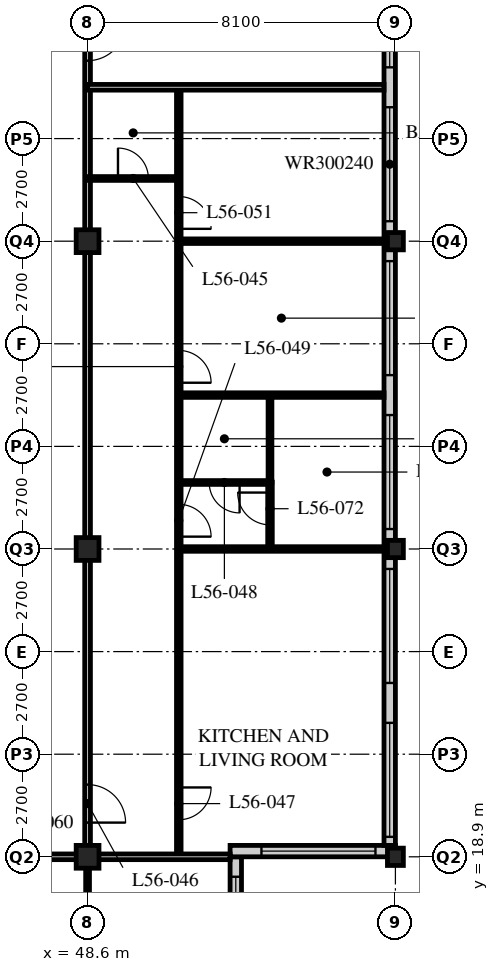
"""IFC4 building model, lengths in metres.
Left out: names, types, materials, properties, quantities, classifications, styles, units other than length and angle.
Written with IfcOpenShell. Run it as: python <this file> out.ifc"""

import sys

from ifc_helpers import new_model, si_unit, direction, frame, frame_2d, origin, origin_2d, place, context, subcontext, project, spatial, rectangle, hollow_rectangle, i_section, extrude, element, fill, save


model = new_model("IFC4")
c1 = context("Model", 3, precision=1e-05, world=origin(), true_north=direction((0.0, 1.0)))
c2 = subcontext(c1, "Body", "Model", "MODEL_VIEW")
j1 = project(units=[si_unit("LENGTHUNIT", "METRE"), si_unit("PLANEANGLEUNIT", "RADIAN")], contexts=[c1])
p1 = place(None, origin())
s1 = spatial("IfcSite", under=j1, at=p1, CompositionType="ELEMENT")
p2 = place(p1, origin())
s2 = spatial("IfcBuilding", under=s1, at=p2, CompositionType="ELEMENT")
p3 = place(p2, frame((0.0, 0.0, 217.2)))
s3 = spatial("IfcBuildingStorey", under=s2, at=p3, CompositionType="ELEMENT", Elevation=217.2)
for number, where, z_axis, x_axis in (
    (1, (48.6, 18.9, 0.0), (0.0, 0.0, 1.0), (1.0, 0.0, 0.0)),
    (2, (48.6, 27.0, 0.0), (0.0, 0.0, 1.0), (1.0, 0.0, 0.0)),
    (3, (48.6, 35.1, 0.0), (0.0, 0.0, 1.0), (1.0, 0.0, 0.0)),
):
    element("IfcColumn", number, at=place(p3, frame(where, z_axis=z_axis, x_axis=x_axis)), inside=s3, PredefinedType="COLUMN", context=c2, shape_type="SweptSolid", body=[
        extrude(hollow_rectangle(XDim=0.6, YDim=0.6, WallThickness=0.05, at=origin_2d()), origin(), (0.0, 0.0, 1.0), 3.6),
    ])
for number, where, z_axis, x_axis in (
    (4, (56.7, 18.9, 0.0), (0.0, 0.0, 1.0), (1.0, 0.0, 0.0)),
    (5, (56.7, 27.0, 0.0), (0.0, 0.0, 1.0), (1.0, 0.0, 0.0)),
    (6, (56.7, 35.1, 0.0), (0.0, 0.0, 1.0), (1.0, 0.0, 0.0)),
):
    element("IfcColumn", number, at=place(p3, frame(where, z_axis=z_axis, x_axis=x_axis)), inside=s3, PredefinedType="COLUMN", context=c2, shape_type="SweptSolid", body=[
        extrude(i_section(OverallWidth=0.418, OverallDepth=0.456, WebThickness=0.042, FlangeThickness=0.067, FilletRadius=0.015, at=origin_2d()), origin(), (0.0, 0.0, 1.0), 3.6),
    ])
p4 = place(p3, frame((52.5, 15.15, 0.0), z_axis=(0.0, 0.0, 1.0), x_axis=(0.0, 1.0, 0.0)))
e7 = element("IfcWall", 7, at=p4, inside=s3, PredefinedType="SOLIDWALL", context=c2, shape_type="SweptSolid", body=[
    extrude(rectangle(XDim=3.75, YDim=0.3, at=frame_2d((1.875, 0.0))), origin(), (0.0, 0.0, 1.0), 3.39),
])
p5 = place(p4, frame((0.225, 0.0, 0.6)))
e8 = element("IfcOpeningElement", 8, at=p5, cuts=e7, PredefinedType="OPENING", context=c2, shape_type="SweptSolid", body=[
    extrude(rectangle(XDim=3.0, YDim=2.0, at=frame_2d((1.5, 1.0))), frame((0.0, 0.16, 0.0), z_axis=(0.0, -1.0, 0.0), x_axis=(1.0, 0.0, 0.0)), (0.0, 0.0, 1.0), 0.32),
])
p6 = place(p3, frame((52.35, 19.05, 0.0), z_axis=(0.0, 0.0, 1.0), x_axis=(1.0, 0.0, 0.0)))
e9 = element("IfcWall", 9, at=p6, inside=s3, PredefinedType="SOLIDWALL", context=c2, shape_type="SweptSolid", body=[
    extrude(rectangle(XDim=4.35, YDim=0.3, at=frame_2d((2.175, 0.0))), origin(), (0.0, 0.0, 1.0), 3.39),
])
p7 = place(p6, frame((0.825, 0.0, 0.6)))
e10 = element("IfcOpeningElement", 10, at=p7, cuts=e9, PredefinedType="OPENING", context=c2, shape_type="SweptSolid", body=[
    extrude(rectangle(XDim=3.0, YDim=2.0, at=frame_2d((1.5, 1.0))), frame((0.0, 0.16, 0.0), z_axis=(0.0, -1.0, 0.0), x_axis=(1.0, 0.0, 0.0)), (0.0, 0.0, 1.0), 0.32),
])
p8 = place(p3, frame((56.55, 19.2, 0.0), z_axis=(0.0, 0.0, 1.0), x_axis=(0.0, 1.0, 0.0)))
e11 = element("IfcWall", 11, at=p8, inside=s3, PredefinedType="SOLIDWALL", context=c2, shape_type="SweptSolid", body=[
    extrude(rectangle(XDim=32.1, YDim=0.3, at=frame_2d((16.05, 0.0))), origin(), (0.0, 0.0, 1.0), 3.39),
])
p9 = place(p8, frame((0.225, 0.0, 0.6)))
e12 = element("IfcOpeningElement", 12, at=p9, cuts=e11, PredefinedType="OPENING", context=c2, shape_type="SweptSolid", body=[
    extrude(rectangle(XDim=3.0, YDim=2.4, at=frame_2d((1.5, 1.2))), frame((0.0, 0.16, 0.0), z_axis=(0.0, -1.0, 0.0), x_axis=(1.0, 0.0, 0.0)), (0.0, 0.0, 1.0), 0.32),
])
p10 = place(p8, frame((4.275, 0.0, 0.6)))
e13 = element("IfcOpeningElement", 13, at=p10, cuts=e11, PredefinedType="OPENING", context=c2, shape_type="SweptSolid", body=[
    extrude(rectangle(XDim=3.0, YDim=2.4, at=frame_2d((1.5, 1.2))), frame((0.0, 0.16, 0.0), z_axis=(0.0, -1.0, 0.0), x_axis=(1.0, 0.0, 0.0)), (0.0, 0.0, 1.0), 0.32),
])
p11 = place(p8, frame((8.325, 0.0, 0.6)))
e14 = element("IfcOpeningElement", 14, at=p11, cuts=e11, PredefinedType="OPENING", context=c2, shape_type="SweptSolid", body=[
    extrude(rectangle(XDim=3.0, YDim=2.4, at=frame_2d((1.5, 1.2))), frame((0.0, 0.16, 0.0), z_axis=(0.0, -1.0, 0.0), x_axis=(1.0, 0.0, 0.0)), (0.0, 0.0, 1.0), 0.32),
])
p12 = place(p8, frame((12.375, 0.0, 0.6)))
e15 = element("IfcOpeningElement", 15, at=p12, cuts=e11, PredefinedType="OPENING", context=c2, shape_type="SweptSolid", body=[
    extrude(rectangle(XDim=3.0, YDim=2.4, at=frame_2d((1.5, 1.2))), frame((0.0, 0.16, 0.0), z_axis=(0.0, -1.0, 0.0), x_axis=(1.0, 0.0, 0.0)), (0.0, 0.0, 1.0), 0.32),
])
p13 = place(p8, frame((16.425, 0.0, 0.6)))
e16 = element("IfcOpeningElement", 16, at=p13, cuts=e11, PredefinedType="OPENING", context=c2, shape_type="SweptSolid", body=[
    extrude(rectangle(XDim=3.0, YDim=2.4, at=frame_2d((1.5, 1.2))), frame((0.0, 0.16, 0.0), z_axis=(0.0, -1.0, 0.0), x_axis=(1.0, 0.0, 0.0)), (0.0, 0.0, 1.0), 0.32),
])
p14 = place(p8, frame((20.475, 0.0, 0.6)))
e17 = element("IfcOpeningElement", 17, at=p14, cuts=e11, PredefinedType="OPENING", context=c2, shape_type="SweptSolid", body=[
    extrude(rectangle(XDim=3.0, YDim=2.4, at=frame_2d((1.5, 1.2))), frame((0.0, 0.16, 0.0), z_axis=(0.0, -1.0, 0.0), x_axis=(1.0, 0.0, 0.0)), (0.0, 0.0, 1.0), 0.32),
])
p15 = place(p8, frame((24.525, 0.0, 0.6)))
e18 = element("IfcOpeningElement", 18, at=p15, cuts=e11, PredefinedType="OPENING", context=c2, shape_type="SweptSolid", body=[
    extrude(rectangle(XDim=3.0, YDim=2.4, at=frame_2d((1.5, 1.2))), frame((0.0, 0.16, 0.0), z_axis=(0.0, -1.0, 0.0), x_axis=(1.0, 0.0, 0.0)), (0.0, 0.0, 1.0), 0.32),
])
p16 = place(p8, frame((28.575, 0.0, 0.6)))
e19 = element("IfcOpeningElement", 19, at=p16, cuts=e11, PredefinedType="OPENING", context=c2, shape_type="SweptSolid", body=[
    extrude(rectangle(XDim=3.0, YDim=2.4, at=frame_2d((1.5, 1.2))), frame((0.0, 0.16, 0.0), z_axis=(0.0, -1.0, 0.0), x_axis=(1.0, 0.0, 0.0)), (0.0, 0.0, 1.0), 0.32),
])
p17 = place(p3, frame((12.15, 18.9, 0.0), z_axis=(0.0, 0.0, 1.0), x_axis=(1.0, 0.0, 0.0)))
e20 = element("IfcWall", 20, at=p17, inside=s3, PredefinedType="PARTITIONING", context=c2, shape_type="SweptSolid", body=[
    extrude(rectangle(XDim=36.45, YDim=0.15, at=frame_2d((18.225, 0.0))), origin(), (0.0, 0.0, 1.0), 2.778),
])
p18 = place(p17, frame((4.95, 0.0, 0.0)))
e21 = element("IfcOpeningElement", 21, at=p18, cuts=e20, PredefinedType="OPENING", context=c2, shape_type="SweptSolid", body=[
    extrude(rectangle(XDim=1.0, YDim=2.1, at=frame_2d((0.5, 1.05))), frame((0.0, 0.085, 0.0), z_axis=(0.0, -1.0, 0.0), x_axis=(1.0, 0.0, 0.0)), (0.0, 0.0, 1.0), 0.17),
])
p19 = place(p17, frame((22.6, 0.0, 0.0)))
e22 = element("IfcOpeningElement", 22, at=p19, cuts=e20, PredefinedType="OPENING", context=c2, shape_type="SweptSolid", body=[
    extrude(rectangle(XDim=1.0, YDim=2.1, at=frame_2d((0.5, 1.05))), frame((0.0, 0.085, 0.0), z_axis=(0.0, -1.0, 0.0), x_axis=(1.0, 0.0, 0.0)), (0.0, 0.0, 1.0), 0.17),
])
p20 = place(p17, frame((25.0, 0.0, 0.0)))
e23 = element("IfcOpeningElement", 23, at=p20, cuts=e20, PredefinedType="OPENING", context=c2, shape_type="SweptSolid", body=[
    extrude(rectangle(XDim=1.0, YDim=2.1, at=frame_2d((0.5, 1.05))), frame((0.0, 0.085, 0.0), z_axis=(0.0, -1.0, 0.0), x_axis=(1.0, 0.0, 0.0)), (0.0, 0.0, 1.0), 0.17),
])
p21 = place(p17, frame((30.7, 0.0, 0.0)))
e24 = element("IfcOpeningElement", 24, at=p21, cuts=e20, PredefinedType="OPENING", context=c2, shape_type="SweptSolid", body=[
    extrude(rectangle(XDim=1.0, YDim=2.1, at=frame_2d((0.5, 1.05))), frame((0.0, 0.085, 0.0), z_axis=(0.0, -1.0, 0.0), x_axis=(1.0, 0.0, 0.0)), (0.0, 0.0, 1.0), 0.17),
])
p22 = place(p17, frame((1.525, 0.0, 0.0)))
e25 = element("IfcOpeningElement", 25, at=p22, cuts=e20, PredefinedType="OPENING", context=c2, shape_type="SweptSolid", body=[
    extrude(rectangle(XDim=1.0, YDim=2.1, at=frame_2d((0.5, 1.05))), frame((0.0, 0.085, 0.0), z_axis=(0.0, -1.0, 0.0), x_axis=(1.0, 0.0, 0.0)), (0.0, 0.0, 1.0), 0.17),
])
p23 = place(p17, frame((32.825, 0.0, 0.0)))
e26 = element("IfcOpeningElement", 26, at=p23, cuts=e20, PredefinedType="OPENING", context=c2, shape_type="SweptSolid", body=[
    extrude(rectangle(XDim=1.0, YDim=2.1, at=frame_2d((0.5, 1.05))), frame((0.0, 0.085, 0.0), z_axis=(0.0, -1.0, 0.0), x_axis=(1.0, 0.0, 0.0)), (0.0, 0.0, 1.0), 0.17),
])
p24 = place(p3, frame((48.6, 18.9, 0.0), z_axis=(0.0, 0.0, 1.0), x_axis=(0.0, 1.0, 0.0)))
e27 = element("IfcWall", 27, at=p24, inside=s3, PredefinedType="PARTITIONING", context=c2, shape_type="SweptSolid", body=[
    extrude(rectangle(XDim=24.3, YDim=0.15, at=frame_2d((12.15, 0.0))), origin(), (0.0, 0.0, 1.0), 2.778),
])
p25 = place(p24, frame((0.9, 0.0, 0.0)))
e28 = element("IfcOpeningElement", 28, at=p25, cuts=e27, PredefinedType="OPENING", context=c2, shape_type="SweptSolid", body=[
    extrude(rectangle(XDim=1.0, YDim=2.1, at=frame_2d((0.5, 1.05))), frame((0.0, 0.085, 0.0), z_axis=(0.0, -1.0, 0.0), x_axis=(1.0, 0.0, 0.0)), (0.0, 0.0, 1.0), 0.17),
])
p26 = place(p24, frame((20.95, 0.0, 0.0)))
e29 = element("IfcOpeningElement", 29, at=p26, cuts=e27, PredefinedType="OPENING", context=c2, shape_type="SweptSolid", body=[
    extrude(rectangle(XDim=1.0, YDim=2.1, at=frame_2d((0.5, 1.05))), frame((0.0, 0.085, 0.0), z_axis=(0.0, -1.0, 0.0), x_axis=(1.0, 0.0, 0.0)), (0.0, 0.0, 1.0), 0.17),
])
p27 = place(p3, frame((51.0, 18.9, 0.0), z_axis=(0.0, 0.0, 1.0), x_axis=(0.0, 1.0, 0.0)))
e30 = element("IfcWall", 30, at=p27, inside=s3, PredefinedType="PARTITIONING", context=c2, shape_type="SweptSolid", body=[
    extrude(rectangle(XDim=20.25, YDim=0.12, at=frame_2d((10.125, 0.0))), origin(), (0.0, 0.0, 1.0), 3.39),
])
p28 = place(p27, frame((0.975, 0.0, 0.0)))
e31 = element("IfcOpeningElement", 31, at=p28, cuts=e30, PredefinedType="OPENING", context=c2, shape_type="SweptSolid", body=[
    extrude(rectangle(XDim=0.85, YDim=2.1, at=frame_2d((0.425, 1.05))), frame((0.0, 0.07, 0.0), z_axis=(0.0, -1.0, 0.0), x_axis=(1.0, 0.0, 0.0)), (0.0, 0.0, 1.0), 0.14),
])
p29 = place(p27, frame((8.425, 0.0, 0.0)))
e32 = element("IfcOpeningElement", 32, at=p29, cuts=e30, PredefinedType="OPENING", context=c2, shape_type="SweptSolid", body=[
    extrude(rectangle(XDim=0.85, YDim=2.1, at=frame_2d((0.425, 1.05))), frame((0.0, 0.07, 0.0), z_axis=(0.0, -1.0, 0.0), x_axis=(1.0, 0.0, 0.0)), (0.0, 0.0, 1.0), 0.14),
])
p30 = place(p27, frame((12.475, 0.0, 0.0)))
e33 = element("IfcOpeningElement", 33, at=p30, cuts=e30, PredefinedType="OPENING", context=c2, shape_type="SweptSolid", body=[
    extrude(rectangle(XDim=0.85, YDim=2.1, at=frame_2d((0.425, 1.05))), frame((0.0, 0.07, 0.0), z_axis=(0.0, -1.0, 0.0), x_axis=(1.0, 0.0, 0.0)), (0.0, 0.0, 1.0), 0.14),
])
p31 = place(p27, frame((16.525, 0.0, 0.0)))
e34 = element("IfcOpeningElement", 34, at=p31, cuts=e30, PredefinedType="OPENING", context=c2, shape_type="SweptSolid", body=[
    extrude(rectangle(XDim=0.85, YDim=2.1, at=frame_2d((0.425, 1.05))), frame((0.0, 0.07, 0.0), z_axis=(0.0, -1.0, 0.0), x_axis=(1.0, 0.0, 0.0)), (0.0, 0.0, 1.0), 0.14),
])
p32 = place(p3, frame((48.6, 36.75, 0.0), z_axis=(0.0, 0.0, 1.0), x_axis=(1.0, 0.0, 0.0)))
e35 = element("IfcWall", 35, at=p32, inside=s3, PredefinedType="PARTITIONING", context=c2, shape_type="SweptSolid", body=[
    extrude(rectangle(XDim=2.4, YDim=0.1, at=frame_2d((1.2, 0.0))), origin(), (0.0, 0.0, 1.0), 3.39),
])
p33 = place(p32, frame((0.8, 0.0, 0.0)))
e36 = element("IfcOpeningElement", 36, at=p33, cuts=e35, PredefinedType="OPENING", context=c2, shape_type="SweptSolid", body=[
    extrude(rectangle(XDim=0.8, YDim=2.1, at=frame_2d((0.4, 1.05))), frame((0.0, 0.06, 0.0), z_axis=(0.0, -1.0, 0.0), x_axis=(1.0, 0.0, 0.0)), (0.0, 0.0, 1.0), 0.12),
])
p34 = place(p3, frame((51.0, 28.75, 0.0), z_axis=(0.0, 0.0, 1.0), x_axis=(1.0, 0.0, 0.0)))
e37 = element("IfcWall", 37, at=p34, inside=s3, PredefinedType="PARTITIONING", context=c2, shape_type="SweptSolid", body=[
    extrude(rectangle(XDim=2.4, YDim=0.1, at=frame_2d((1.2, 0.0))), origin(), (0.0, 0.0, 1.0), 3.39),
])
p35 = place(p34, frame((0.8, 0.0, 0.0)))
e38 = element("IfcOpeningElement", 38, at=p35, cuts=e37, PredefinedType="OPENING", context=c2, shape_type="SweptSolid", body=[
    extrude(rectangle(XDim=0.8, YDim=2.1, at=frame_2d((0.4, 1.05))), frame((0.0, 0.06, 0.0), z_axis=(0.0, -1.0, 0.0), x_axis=(1.0, 0.0, 0.0)), (0.0, 0.0, 1.0), 0.12),
])
p36 = place(p3, frame((53.4, 28.75, 0.0), z_axis=(0.0, 0.0, 1.0), x_axis=(0.0, 1.0, 0.0)))
e39 = element("IfcWall", 39, at=p36, inside=s3, PredefinedType="PARTITIONING", context=c2, shape_type="SweptSolid", body=[
    extrude(rectangle(XDim=2.3, YDim=0.1, at=frame_2d((1.15, 0.0))), origin(), (0.0, 0.0, 1.0), 3.39),
])
p37 = place(p3, frame((51.0, 27.0, 0.0), z_axis=(0.0, 0.0, 1.0), x_axis=(1.0, 0.0, 0.0)))
e40 = element("IfcWall", 40, at=p37, inside=s3, PredefinedType="PARTITIONING", context=c2, shape_type="SweptSolid", body=[
    extrude(rectangle(XDim=5.4, YDim=0.12, at=frame_2d((2.7, 0.0))), origin(), (0.0, 0.0, 1.0), 2.778),
])
p38 = place(p3, frame((51.0, 31.05, 0.0), z_axis=(0.0, 0.0, 1.0), x_axis=(1.0, 0.0, 0.0)))
e41 = element("IfcWall", 41, at=p38, inside=s3, PredefinedType="PARTITIONING", context=c2, shape_type="SweptSolid", body=[
    extrude(rectangle(XDim=5.4, YDim=0.12, at=frame_2d((2.7, 0.0))), origin(), (0.0, 0.0, 1.0), 3.39),
])
p39 = place(p3, frame((51.0, 35.1, 0.0), z_axis=(0.0, 0.0, 1.0), x_axis=(1.0, 0.0, 0.0)))
e42 = element("IfcWall", 42, at=p39, inside=s3, PredefinedType="PARTITIONING", context=c2, shape_type="SweptSolid", body=[
    extrude(rectangle(XDim=5.4, YDim=0.12, at=frame_2d((2.7, 0.0))), origin(), (0.0, 0.0, 1.0), 2.778),
])
p40 = place(p3, frame((48.6, 39.15, 0.0), z_axis=(0.0, 0.0, 1.0), x_axis=(1.0, 0.0, 0.0)))
e43 = element("IfcWall", 43, at=p40, inside=s3, PredefinedType="PARTITIONING", context=c2, shape_type="SweptSolid", body=[
    extrude(rectangle(XDim=7.8, YDim=0.15, at=frame_2d((3.9, 0.0))), origin(), (0.0, 0.0, 1.0), 3.39),
])
p41 = place(p3, frame((48.6, 18.9, 0.0), z_axis=(0.0, 0.0, 1.0), x_axis=(0.0, -1.0, 0.0)))
e44 = element("IfcWall", 44, at=p41, inside=s3, PredefinedType="PARTITIONING", context=c2, shape_type="SweptSolid", body=[
    extrude(rectangle(XDim=2.4, YDim=0.1, at=frame_2d((1.2, 0.0))), origin(), (0.0, 0.0, 1.0), 2.778),
])
p42 = place(p3, frame((48.6, 18.9, 0.0), z_axis=(0.0, 0.0, 1.0), x_axis=(1.0, 0.0, 0.0)))
e45 = element("IfcWall", 45, at=p42, inside=s3, PredefinedType="PARTITIONING", context=c2, shape_type="SweptSolid", body=[
    extrude(rectangle(XDim=3.75, YDim=0.15, at=frame_2d((1.875, 0.0))), origin(), (0.0, 0.0, 1.0), 2.778),
])
p43 = place(p3, frame((53.4, 28.76, 0.0), z_axis=(0.0, 0.0, 1.0), x_axis=(0.0, -1.0, 0.0)))
e46 = element("IfcWall", 46, at=p43, inside=s3, PredefinedType="PARTITIONING", context=c2, shape_type="SweptSolid", body=[
    extrude(rectangle(XDim=1.76, YDim=0.12, at=frame_2d((0.88, 0.0))), origin(), (0.0, 0.0, 1.0), 3.39),
])
p44 = place(p43, frame((0.275, 0.0, 0.0)))
e47 = element("IfcOpeningElement", 47, at=p44, cuts=e46, PredefinedType="OPENING", context=c2, shape_type="SweptSolid", body=[
    extrude(rectangle(XDim=0.85, YDim=2.1, at=frame_2d((0.425, 1.05))), frame((0.0, 0.07, 0.0), z_axis=(0.0, -1.0, 0.0), x_axis=(1.0, 0.0, 0.0)), (0.0, 0.0, 1.0), 0.14),
])
p45 = place(p5, origin())
e48 = element("IfcWindow", 48, at=p45, inside=s3, PartitioningType="SINGLE_PANEL", PredefinedType="WINDOW", context=c2, shape_type="SweptSolid", body=[
    extrude(rectangle(XDim=3.0, YDim=2.0, at=frame_2d((1.5, 1.0))), frame((0.0, 0.03, 0.0), z_axis=(0.0, -1.0, 0.0), x_axis=(1.0, 0.0, 0.0)), (0.0, 0.0, 1.0), 0.06),
])
fill(e8, e48)
p46 = place(p7, origin())
e49 = element("IfcWindow", 49, at=p46, inside=s3, PartitioningType="SINGLE_PANEL", PredefinedType="WINDOW", context=c2, shape_type="SweptSolid", body=[
    extrude(rectangle(XDim=3.0, YDim=2.0, at=frame_2d((1.5, 1.0))), frame((0.0, 0.03, 0.0), z_axis=(0.0, -1.0, 0.0), x_axis=(1.0, 0.0, 0.0)), (0.0, 0.0, 1.0), 0.06),
])
fill(e10, e49)
p47 = place(p9, origin())
e50 = element("IfcWindow", 50, at=p47, inside=s3, PartitioningType="SINGLE_PANEL", PredefinedType="WINDOW", context=c2, shape_type="SweptSolid", body=[
    extrude(rectangle(XDim=3.0, YDim=2.4, at=frame_2d((1.5, 1.2))), frame((0.0, 0.03, 0.0), z_axis=(0.0, -1.0, 0.0), x_axis=(1.0, 0.0, 0.0)), (0.0, 0.0, 1.0), 0.06),
])
fill(e12, e50)
p48 = place(p10, origin())
e51 = element("IfcWindow", 51, at=p48, inside=s3, PartitioningType="SINGLE_PANEL", PredefinedType="WINDOW", context=c2, shape_type="SweptSolid", body=[
    extrude(rectangle(XDim=3.0, YDim=2.4, at=frame_2d((1.5, 1.2))), frame((0.0, 0.03, 0.0), z_axis=(0.0, -1.0, 0.0), x_axis=(1.0, 0.0, 0.0)), (0.0, 0.0, 1.0), 0.06),
])
fill(e13, e51)
p49 = place(p11, origin())
e52 = element("IfcWindow", 52, at=p49, inside=s3, PartitioningType="SINGLE_PANEL", PredefinedType="WINDOW", context=c2, shape_type="SweptSolid", body=[
    extrude(rectangle(XDim=3.0, YDim=2.4, at=frame_2d((1.5, 1.2))), frame((0.0, 0.03, 0.0), z_axis=(0.0, -1.0, 0.0), x_axis=(1.0, 0.0, 0.0)), (0.0, 0.0, 1.0), 0.06),
])
fill(e14, e52)
p50 = place(p12, origin())
e53 = element("IfcWindow", 53, at=p50, inside=s3, PartitioningType="SINGLE_PANEL", PredefinedType="WINDOW", context=c2, shape_type="SweptSolid", body=[
    extrude(rectangle(XDim=3.0, YDim=2.4, at=frame_2d((1.5, 1.2))), frame((0.0, 0.03, 0.0), z_axis=(0.0, -1.0, 0.0), x_axis=(1.0, 0.0, 0.0)), (0.0, 0.0, 1.0), 0.06),
])
fill(e15, e53)
p51 = place(p13, origin())
e54 = element("IfcWindow", 54, at=p51, inside=s3, PartitioningType="SINGLE_PANEL", PredefinedType="WINDOW", context=c2, shape_type="SweptSolid", body=[
    extrude(rectangle(XDim=3.0, YDim=2.4, at=frame_2d((1.5, 1.2))), frame((0.0, 0.03, 0.0), z_axis=(0.0, -1.0, 0.0), x_axis=(1.0, 0.0, 0.0)), (0.0, 0.0, 1.0), 0.06),
])
fill(e16, e54)
p52 = place(p14, origin())
e55 = element("IfcWindow", 55, at=p52, inside=s3, PartitioningType="SINGLE_PANEL", PredefinedType="WINDOW", context=c2, shape_type="SweptSolid", body=[
    extrude(rectangle(XDim=3.0, YDim=2.4, at=frame_2d((1.5, 1.2))), frame((0.0, 0.03, 0.0), z_axis=(0.0, -1.0, 0.0), x_axis=(1.0, 0.0, 0.0)), (0.0, 0.0, 1.0), 0.06),
])
fill(e17, e55)
p53 = place(p33, origin())
e56 = element("IfcDoor", 56, at=p53, inside=s3, OperationType="SINGLE_SWING_LEFT", PredefinedType="DOOR", context=c2, shape_type="SweptSolid", body=[
    extrude(rectangle(XDim=0.8, YDim=2.1, at=frame_2d((0.4, 1.05))), frame((0.0, 0.025, 0.0), z_axis=(0.0, -1.0, 0.0), x_axis=(1.0, 0.0, 0.0)), (0.0, 0.0, 1.0), 0.05),
])
fill(e36, e56)
p54 = place(p25, origin())
e57 = element("IfcDoor", 57, at=p54, inside=s3, OperationType="SINGLE_SWING_RIGHT", PredefinedType="DOOR", context=c2, shape_type="SweptSolid", body=[
    extrude(rectangle(XDim=1.0, YDim=2.1, at=frame_2d((0.5, 1.05))), frame((0.0, 0.025, 0.0), z_axis=(0.0, -1.0, 0.0), x_axis=(1.0, 0.0, 0.0)), (0.0, 0.0, 1.0), 0.05),
])
fill(e28, e57)
p55 = place(p28, origin())
e58 = element("IfcDoor", 58, at=p55, inside=s3, OperationType="SINGLE_SWING_LEFT", PredefinedType="DOOR", context=c2, shape_type="SweptSolid", body=[
    extrude(rectangle(XDim=0.85, YDim=2.1, at=frame_2d((0.425, 1.05))), frame((0.0, 0.025, 0.0), z_axis=(0.0, -1.0, 0.0), x_axis=(1.0, 0.0, 0.0)), (0.0, 0.0, 1.0), 0.05),
])
fill(e31, e58)
p56 = place(p35, origin())
e59 = element("IfcDoor", 59, at=p56, inside=s3, OperationType="SINGLE_SWING_LEFT", PredefinedType="DOOR", context=c2, shape_type="SweptSolid", body=[
    extrude(rectangle(XDim=0.8, YDim=2.1, at=frame_2d((0.4, 1.05))), frame((0.0, 0.025, 0.0), z_axis=(0.0, -1.0, 0.0), x_axis=(1.0, 0.0, 0.0)), (0.0, 0.0, 1.0), 0.05),
])
fill(e38, e59)
p57 = place(p29, origin())
e60 = element("IfcDoor", 60, at=p57, inside=s3, OperationType="SINGLE_SWING_RIGHT", PredefinedType="DOOR", context=c2, shape_type="SweptSolid", body=[
    extrude(rectangle(XDim=0.85, YDim=2.1, at=frame_2d((0.425, 1.05))), frame((0.0, 0.025, 0.0), z_axis=(0.0, -1.0, 0.0), x_axis=(1.0, 0.0, 0.0)), (0.0, 0.0, 1.0), 0.05),
])
fill(e32, e60)
p58 = place(p30, origin())
e61 = element("IfcDoor", 61, at=p58, inside=s3, OperationType="SINGLE_SWING_RIGHT", PredefinedType="DOOR", context=c2, shape_type="SweptSolid", body=[
    extrude(rectangle(XDim=0.85, YDim=2.1, at=frame_2d((0.425, 1.05))), frame((0.0, 0.025, 0.0), z_axis=(0.0, -1.0, 0.0), x_axis=(1.0, 0.0, 0.0)), (0.0, 0.0, 1.0), 0.05),
])
fill(e33, e61)
p59 = place(p31, origin())
e62 = element("IfcDoor", 62, at=p59, inside=s3, OperationType="SINGLE_SWING_RIGHT", PredefinedType="DOOR", context=c2, shape_type="SweptSolid", body=[
    extrude(rectangle(XDim=0.85, YDim=2.1, at=frame_2d((0.425, 1.05))), frame((0.0, 0.025, 0.0), z_axis=(0.0, -1.0, 0.0), x_axis=(1.0, 0.0, 0.0)), (0.0, 0.0, 1.0), 0.05),
])
fill(e34, e62)
p60 = place(p26, origin())
e63 = element("IfcDoor", 63, at=p60, inside=s3, OperationType="SINGLE_SWING_LEFT", PredefinedType="DOOR", context=c2, shape_type="SweptSolid", body=[
    extrude(rectangle(XDim=1.0, YDim=2.1, at=frame_2d((0.5, 1.05))), frame((0.0, 0.025, 0.0), z_axis=(0.0, -1.0, 0.0), x_axis=(1.0, 0.0, 0.0)), (0.0, 0.0, 1.0), 0.05),
])
fill(e29, e63)
p61 = place(p44, origin())
e64 = element("IfcDoor", 64, at=p61, inside=s3, OperationType="SINGLE_SWING_RIGHT", PredefinedType="DOOR", context=c2, shape_type="SweptSolid", body=[
    extrude(rectangle(XDim=0.85, YDim=2.1, at=frame_2d((0.425, 1.05))), frame((0.0, 0.025, 0.0), z_axis=(0.0, -1.0, 0.0), x_axis=(1.0, 0.0, 0.0)), (0.0, 0.0, 1.0), 0.05),
])
fill(e47, e64)
save(model, sys.argv[1])
